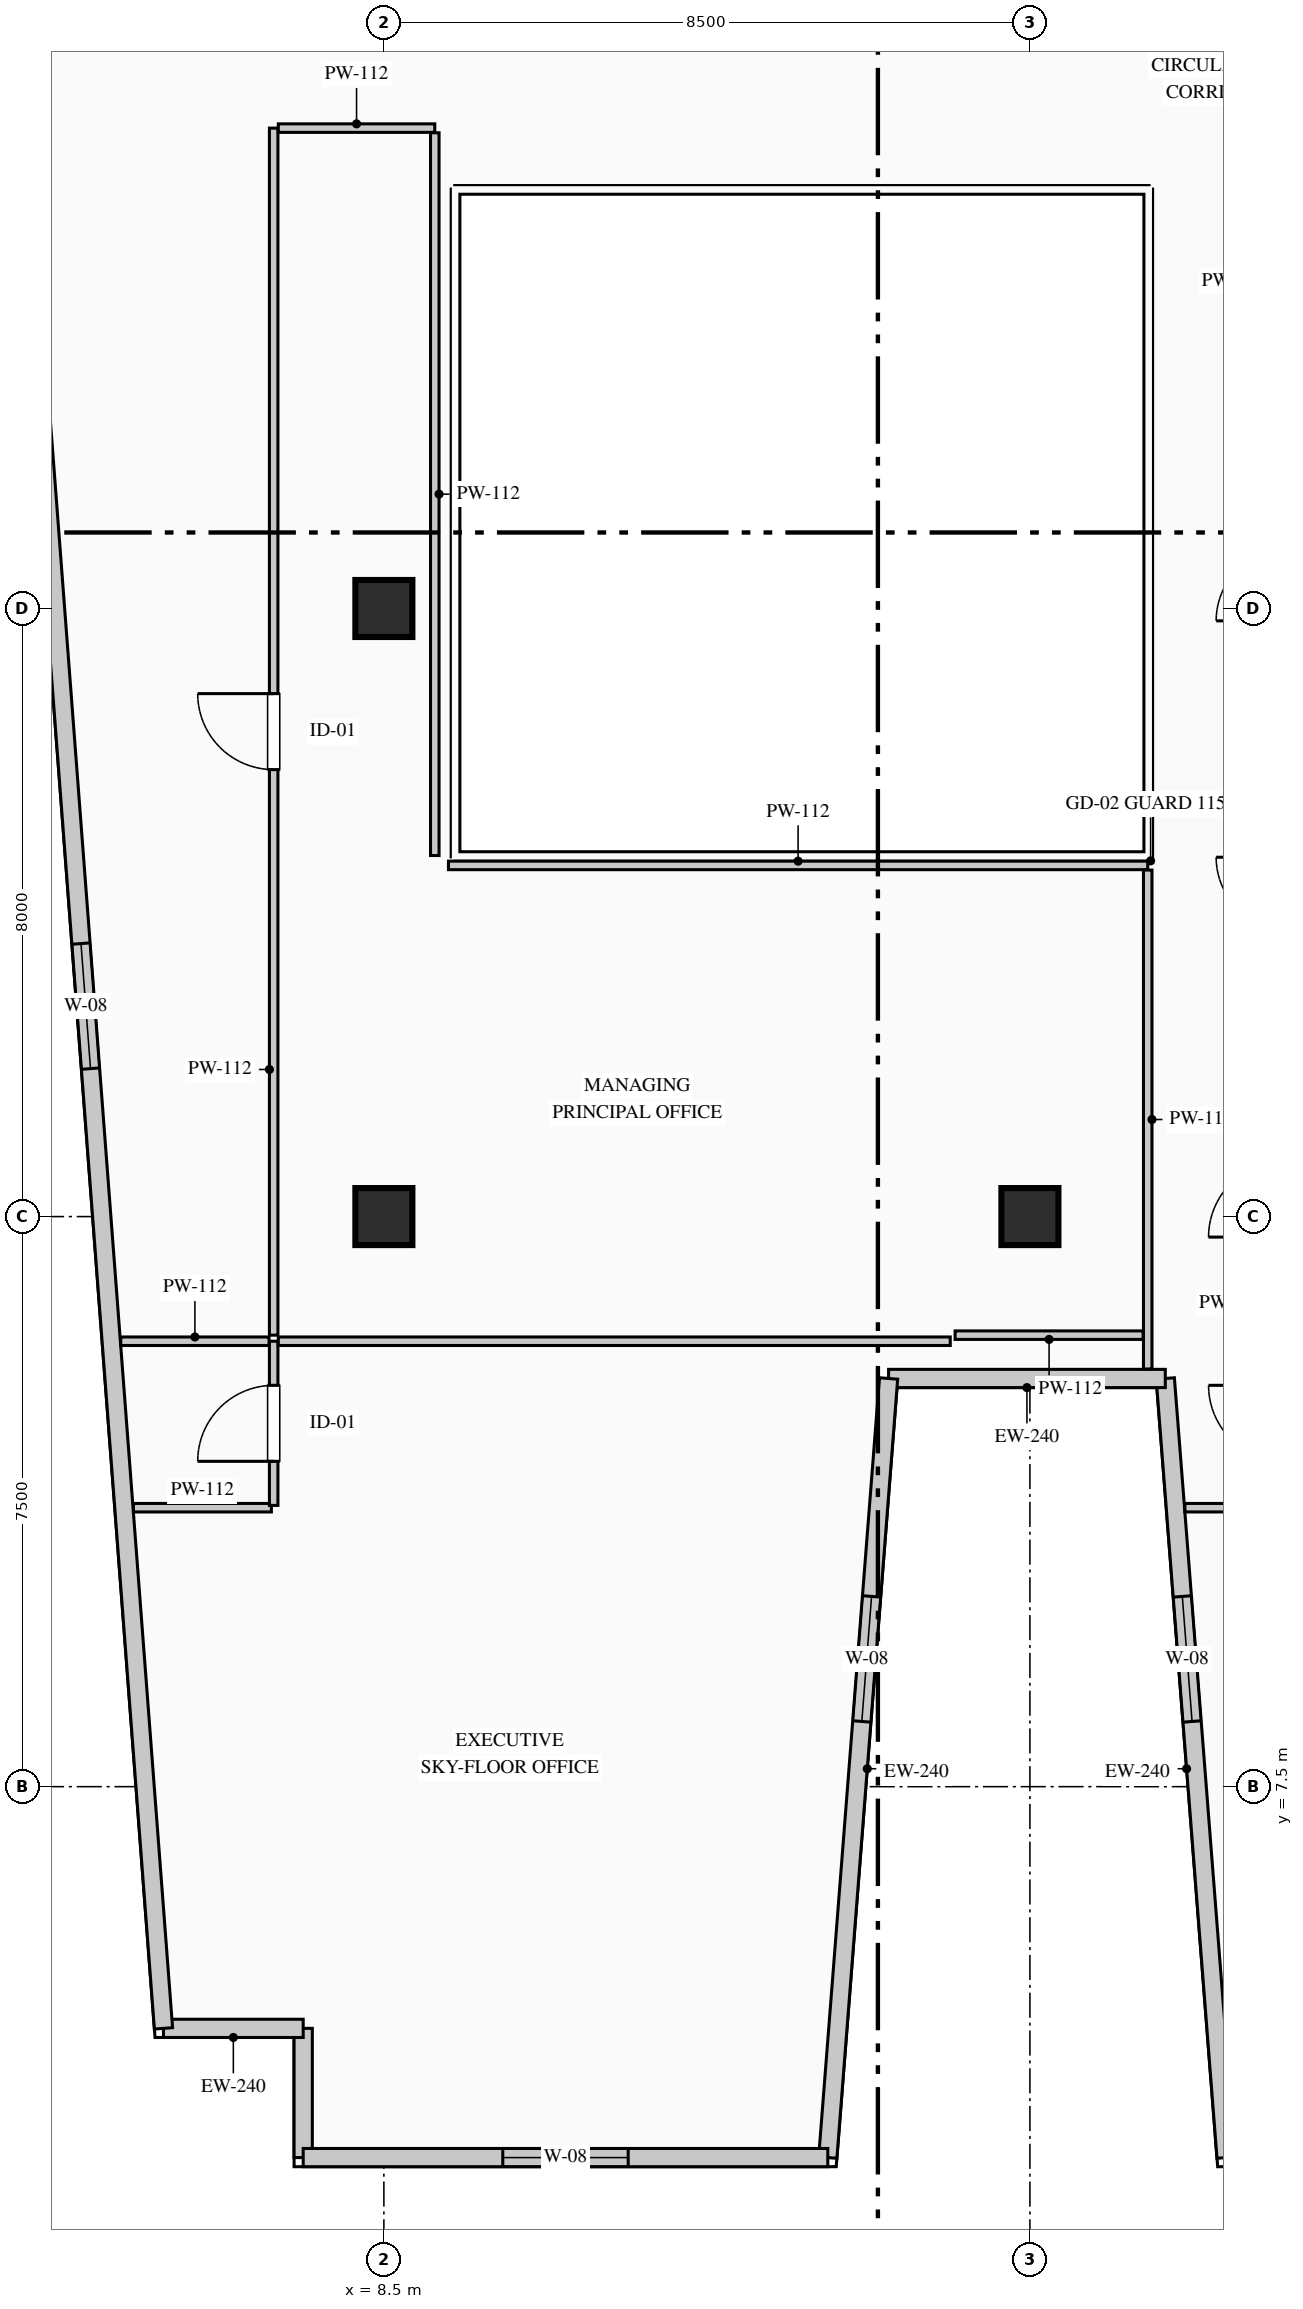
"""IFC4 building model, lengths in metres.
Left out: names, types, materials, properties, quantities, classifications, styles, units other than length and angle.
Written with IfcOpenShell. Run it as: python <this file> out.ifc"""

import sys

from ifc_helpers import new_model, si_unit, direction, frame, frame_2d, origin, origin_2d, place, context, subcontext, project, spatial, rectangle, extrude, element, fill, save


model = new_model("IFC4")
c1 = context("Model", 3, precision=1e-05, world=origin(), true_north=direction((0.0, 1.0)))
c2 = subcontext(c1, "Body", "Model", "MODEL_VIEW")
j1 = project(units=[si_unit("LENGTHUNIT", "METRE"), si_unit("PLANEANGLEUNIT", "RADIAN")], contexts=[c1])
p1 = place(None, origin())
s1 = spatial("IfcSite", under=j1, at=p1, CompositionType="ELEMENT")
p2 = place(p1, origin())
s2 = spatial("IfcBuilding", under=s1, at=p2, CompositionType="ELEMENT")
p3 = place(p2, frame((0.0, 0.0, 276.45)))
s3 = spatial("IfcBuildingStorey", under=s2, at=p3, CompositionType="ELEMENT", Elevation=276.45)
for number, where, z_axis, x_axis in (
    (1, (8.5, 15.0, 0.0), (0.0, 0.0, 1.0), (1.0, 0.0, 0.0)),
    (2, (8.5, 23.0, 0.0), (0.0, 0.0, 1.0), (1.0, 0.0, 0.0)),
    (3, (17.0, 15.0, 0.0), (0.0, 0.0, 1.0), (1.0, 0.0, 0.0)),
):
    element("IfcColumn", number, at=place(p3, frame(where, z_axis=z_axis, x_axis=x_axis)), inside=s3, PredefinedType="COLUMN", context=c2, shape_type="SweptSolid", body=[
        extrude(rectangle(XDim=0.75, YDim=0.75, at=origin_2d()), origin(), (0.0, 0.0, 1.0), 3.95),
    ])
p4 = place(p3, frame((7.438, 2.62, 0.0), z_axis=(0.0, 0.0, 1.0), x_axis=(0.0, 1.0, 0.0)))
e4 = element("IfcWall", 4, at=p4, inside=s3, PredefinedType="STANDARD", context=c2, shape_type="SweptSolid", body=[
    extrude(rectangle(XDim=1.7, YDim=0.24, at=frame_2d((0.85, 0.0))), origin(), (0.0, 0.0, 1.0), 3.7),
])
p5 = place(p3, frame((7.438, 4.32, 0.0), z_axis=(0.0, 0.0, 1.0), x_axis=(-1.0, 0.0, 0.0)))
e5 = element("IfcWall", 5, at=p5, inside=s3, PredefinedType="STANDARD", context=c2, shape_type="SweptSolid", body=[
    extrude(rectangle(XDim=1.838, YDim=0.24, at=frame_2d((0.919, 0.0))), origin(), (0.0, 0.0, 1.0), 3.7),
])
p6 = place(p3, frame((5.6, 4.32, 0.0), z_axis=(0.0, 0.0, 1.0), x_axis=(-0.075839920993, 0.997120006009, 0.0)))
e6 = element("IfcWall", 6, at=p6, inside=s3, PredefinedType="STANDARD", context=c2, shape_type="SweptSolid", body=[
    extrude(rectangle(XDim=37.468, YDim=0.24, at=frame_2d((18.734, 0.0))), origin(), (0.0, 0.0, 1.0), 3.7),
])
p7 = place(p6, frame((12.663, 0.0, 0.9)))
e7 = element("IfcOpeningElement", 7, at=p7, cuts=e6, PredefinedType="OPENING", context=c2, shape_type="SweptSolid", body=[
    extrude(rectangle(XDim=1.65, YDim=1.95, at=frame_2d((0.825, 0.975))), frame((0.0, 0.13, 0.0), z_axis=(0.0, -1.0, 0.0), x_axis=(1.0, 0.0, 0.0)), (0.0, 0.0, 1.0), 0.26),
])
p8 = place(p3, frame((19.581, 2.62, 0.0), z_axis=(0.0, 0.0, 1.0), x_axis=(-0.077816860153, 0.996967670627, 0.0)))
e8 = element("IfcWall", 8, at=p8, inside=s3, PredefinedType="STANDARD", context=c2, shape_type="SweptSolid", body=[
    extrude(rectangle(XDim=10.281, YDim=0.24, at=frame_2d((5.141, 0.0))), origin(), (0.0, 0.0, 1.0), 3.7),
])
p9 = place(p8, frame((5.755, 0.0, 0.9)))
e9 = element("IfcOpeningElement", 9, at=p9, cuts=e8, PredefinedType="OPENING", context=c2, shape_type="SweptSolid", body=[
    extrude(rectangle(XDim=1.65, YDim=1.95, at=frame_2d((0.825, 0.975))), frame((0.0, 0.13, 0.0), z_axis=(0.0, -1.0, 0.0), x_axis=(1.0, 0.0, 0.0)), (0.0, 0.0, 1.0), 0.26),
])
p10 = place(p3, frame((18.781, 12.87, 0.0), z_axis=(0.0, 0.0, 1.0), x_axis=(-1.0, 0.0, 0.0)))
e10 = element("IfcWall", 10, at=p10, inside=s3, PredefinedType="STANDARD", context=c2, shape_type="SweptSolid", body=[
    extrude(rectangle(XDim=3.641, YDim=0.24, at=frame_2d((1.82, 0.0))), origin(), (0.0, 0.0, 1.0), 3.7),
])
p11 = place(p3, frame((15.14, 12.87, 0.0), z_axis=(0.0, 0.0, 1.0), x_axis=(-0.077793257511, -0.996969512616, 0.0)))
e11 = element("IfcWall", 11, at=p11, inside=s3, PredefinedType="STANDARD", context=c2, shape_type="SweptSolid", body=[
    extrude(rectangle(XDim=10.281, YDim=0.24, at=frame_2d((5.141, 0.0))), origin(), (0.0, 0.0, 1.0), 3.7),
])
p12 = place(p11, frame((2.876, 0.0, 0.9)))
e12 = element("IfcOpeningElement", 12, at=p12, cuts=e11, PredefinedType="OPENING", context=c2, shape_type="SweptSolid", body=[
    extrude(rectangle(XDim=1.65, YDim=1.95, at=frame_2d((0.825, 0.975))), frame((0.0, 0.13, 0.0), z_axis=(0.0, -1.0, 0.0), x_axis=(1.0, 0.0, 0.0)), (0.0, 0.0, 1.0), 0.26),
])
p13 = place(p3, frame((14.341, 2.62, 0.0), z_axis=(0.0, 0.0, 1.0), x_axis=(-1.0, 0.0, 0.0)))
e13 = element("IfcWall", 13, at=p13, inside=s3, PredefinedType="STANDARD", context=c2, shape_type="SweptSolid", body=[
    extrude(rectangle(XDim=6.902, YDim=0.24, at=frame_2d((3.451, 0.0))), origin(), (0.0, 0.0, 1.0), 3.7),
])
p14 = place(p13, frame((2.626, 0.0, 0.9)))
e14 = element("IfcOpeningElement", 14, at=p14, cuts=e13, PredefinedType="OPENING", context=c2, shape_type="SweptSolid", body=[
    extrude(rectangle(XDim=1.65, YDim=1.95, at=frame_2d((0.825, 0.975))), frame((0.0, 0.13, 0.0), z_axis=(0.0, -1.0, 0.0), x_axis=(1.0, 0.0, 0.0)), (0.0, 0.0, 1.0), 0.26),
])
p15 = place(p3, frame((5.205, 11.17, 0.0), z_axis=(0.0, 0.0, 1.0), x_axis=(1.0, 0.0, 0.0)))
e15 = element("IfcWall", 15, at=p15, inside=s3, PredefinedType="PARTITIONING", context=c2, shape_type="SweptSolid", body=[
    extrude(rectangle(XDim=1.815, YDim=0.112, at=frame_2d((0.908, 0.0))), origin(), (0.0, 0.0, 1.0), 3.7),
])
p16 = place(p3, frame((7.05, 11.2, 0.0), z_axis=(0.0, 0.0, 1.0), x_axis=(0.0, 1.0, 0.0)))
e16 = element("IfcWall", 16, at=p16, inside=s3, PredefinedType="PARTITIONING", context=c2, shape_type="SweptSolid", body=[
    extrude(rectangle(XDim=2.16, YDim=0.112, at=frame_2d((1.08, 0.0))), origin(), (0.0, 0.0, 1.0), 3.7),
])
p17 = place(p16, frame((0.58, 0.0, 0.0)))
e17 = element("IfcOpeningElement", 17, at=p17, cuts=e16, PredefinedType="OPENING", context=c2, shape_type="SweptSolid", body=[
    extrude(rectangle(XDim=1.0, YDim=2.15, at=frame_2d((0.5, 1.075))), frame((0.0, 0.066, 0.0), z_axis=(0.0, -1.0, 0.0), x_axis=(1.0, 0.0, 0.0)), (0.0, 0.0, 1.0), 0.132),
])
p18 = place(p3, frame((5.038, 13.36, 0.0), z_axis=(0.0, 0.0, 1.0), x_axis=(1.0, 0.0, 0.0)))
e18 = element("IfcWall", 18, at=p18, inside=s3, PredefinedType="PARTITIONING", context=c2, shape_type="SweptSolid", body=[
    extrude(rectangle(XDim=1.951, YDim=0.112, at=frame_2d((0.976, 0.0))), origin(), (0.0, 0.0, 1.0), 3.7),
])
p19 = place(p3, frame((7.111, 13.36, 0.0), z_axis=(0.0, 0.0, 1.0), x_axis=(1.0, 0.0, 0.0)))
e19 = element("IfcWall", 19, at=p19, inside=s3, PredefinedType="PARTITIONING", context=c2, shape_type="SweptSolid", body=[
    extrude(rectangle(XDim=8.841, YDim=0.112, at=frame_2d((4.42, 0.0))), origin(), (0.0, 0.0, 1.0), 3.7),
])
p20 = place(p3, frame((19.039, 11.17, 0.0), z_axis=(0.0, 0.0, 1.0), x_axis=(1.0, 0.0, 0.0)))
e20 = element("IfcWall", 20, at=p20, inside=s3, PredefinedType="PARTITIONING", context=c2, shape_type="SweptSolid", body=[
    extrude(rectangle(XDim=1.281, YDim=0.112, at=frame_2d((0.64, 0.0))), origin(), (0.0, 0.0, 1.0), 3.7),
])
p21 = place(p3, frame((9.35, 19.62, 0.0), z_axis=(0.0, 0.0, 1.0), x_axis=(1.0, 0.0, 0.0)))
e21 = element("IfcWall", 21, at=p21, inside=s3, PredefinedType="PARTITIONING", context=c2, shape_type="SweptSolid", body=[
    extrude(rectangle(XDim=9.2, YDim=0.112, at=frame_2d((4.6, 0.0))), origin(), (0.0, 0.0, 1.0), 3.7),
])
p22 = place(p3, frame((18.55, 19.559, 0.0), z_axis=(0.0, 0.0, 1.0), x_axis=(0.0, -1.0, 0.0)))
e22 = element("IfcWall", 22, at=p22, inside=s3, PredefinedType="PARTITIONING", context=c2, shape_type="SweptSolid", body=[
    extrude(rectangle(XDim=6.564, YDim=0.112, at=frame_2d((3.282, 0.0))), origin(), (0.0, 0.0, 1.0), 3.7),
])
p23 = place(p3, frame((18.489, 13.44, 0.0), z_axis=(0.0, 0.0, 1.0), x_axis=(-1.0, 0.0, 0.0)))
e23 = element("IfcWall", 23, at=p23, inside=s3, PredefinedType="PARTITIONING", context=c2, shape_type="SweptSolid", body=[
    extrude(rectangle(XDim=2.474, YDim=0.112, at=frame_2d((1.237, 0.0))), origin(), (0.0, 0.0, 1.0), 3.7),
])
p24 = place(p3, frame((7.05, 13.44, 0.0), z_axis=(0.0, 0.0, 1.0), x_axis=(0.0, 1.0, 0.0)))
e24 = element("IfcWall", 24, at=p24, inside=s3, PredefinedType="PARTITIONING", context=c2, shape_type="SweptSolid", body=[
    extrude(rectangle(XDim=15.88, YDim=0.112, at=frame_2d((7.94, 0.0))), origin(), (0.0, 0.0, 1.0), 3.7),
])
p25 = place(p24, frame((7.44, 0.0, 0.0)))
e25 = element("IfcOpeningElement", 25, at=p25, cuts=e24, PredefinedType="OPENING", context=c2, shape_type="SweptSolid", body=[
    extrude(rectangle(XDim=1.0, YDim=2.15, at=frame_2d((0.5, 1.075))), frame((0.0, 0.066, 0.0), z_axis=(0.0, -1.0, 0.0), x_axis=(1.0, 0.0, 0.0)), (0.0, 0.0, 1.0), 0.132),
])
p26 = place(p3, frame((7.111, 29.32, 0.0), z_axis=(0.0, 0.0, 1.0), x_axis=(1.0, 0.0, 0.0)))
e26 = element("IfcWall", 26, at=p26, inside=s3, PredefinedType="PARTITIONING", context=c2, shape_type="SweptSolid", body=[
    extrude(rectangle(XDim=2.059, YDim=0.112, at=frame_2d((1.029, 0.0))), origin(), (0.0, 0.0, 1.0), 3.7),
])
p27 = place(p3, frame((9.17, 29.259, 0.0), z_axis=(0.0, 0.0, 1.0), x_axis=(0.0, -1.0, 0.0)))
e27 = element("IfcWall", 27, at=p27, inside=s3, PredefinedType="PARTITIONING", context=c2, shape_type="SweptSolid", body=[
    extrude(rectangle(XDim=9.509, YDim=0.112, at=frame_2d((4.754, 0.0))), origin(), (0.0, 0.0, 1.0), 3.285),
])
p28 = place(p7, origin())
e28 = element("IfcWindow", 28, at=p28, inside=s3, PartitioningType="SINGLE_PANEL", PredefinedType="WINDOW", context=c2, shape_type="SweptSolid", body=[
    extrude(rectangle(XDim=1.65, YDim=1.95, at=frame_2d((0.825, 0.975))), frame((0.0, 0.03, 0.0), z_axis=(0.0, -1.0, 0.0), x_axis=(1.0, 0.0, 0.0)), (0.0, 0.0, 1.0), 0.06),
])
fill(e7, e28)
p29 = place(p9, origin())
e29 = element("IfcWindow", 29, at=p29, inside=s3, PartitioningType="SINGLE_PANEL", PredefinedType="WINDOW", context=c2, shape_type="SweptSolid", body=[
    extrude(rectangle(XDim=1.65, YDim=1.95, at=frame_2d((0.825, 0.975))), frame((0.0, 0.03, 0.0), z_axis=(0.0, -1.0, 0.0), x_axis=(1.0, 0.0, 0.0)), (0.0, 0.0, 1.0), 0.06),
])
fill(e9, e29)
p30 = place(p12, origin())
e30 = element("IfcWindow", 30, at=p30, inside=s3, PartitioningType="SINGLE_PANEL", PredefinedType="WINDOW", context=c2, shape_type="SweptSolid", body=[
    extrude(rectangle(XDim=1.65, YDim=1.95, at=frame_2d((0.825, 0.975))), frame((0.0, 0.03, 0.0), z_axis=(0.0, -1.0, 0.0), x_axis=(1.0, 0.0, 0.0)), (0.0, 0.0, 1.0), 0.06),
])
fill(e12, e30)
p31 = place(p14, origin())
e31 = element("IfcWindow", 31, at=p31, inside=s3, PartitioningType="SINGLE_PANEL", PredefinedType="WINDOW", context=c2, shape_type="SweptSolid", body=[
    extrude(rectangle(XDim=1.65, YDim=1.95, at=frame_2d((0.825, 0.975))), frame((0.0, 0.03, 0.0), z_axis=(0.0, -1.0, 0.0), x_axis=(1.0, 0.0, 0.0)), (0.0, 0.0, 1.0), 0.06),
])
fill(e14, e31)
p32 = place(p17, origin())
e32 = element("IfcDoor", 32, at=p32, inside=s3, OperationType="SINGLE_SWING_LEFT", PredefinedType="DOOR", context=c2, shape_type="SweptSolid", body=[
    extrude(rectangle(XDim=1.0, YDim=2.15, at=frame_2d((0.5, 1.075))), frame((0.0, 0.025, 0.0), z_axis=(0.0, -1.0, 0.0), x_axis=(1.0, 0.0, 0.0)), (0.0, 0.0, 1.0), 0.05),
])
fill(e17, e32)
p33 = place(p25, origin())
e33 = element("IfcDoor", 33, at=p33, inside=s3, OperationType="SINGLE_SWING_RIGHT", PredefinedType="DOOR", context=c2, shape_type="SweptSolid", body=[
    extrude(rectangle(XDim=1.0, YDim=2.15, at=frame_2d((0.5, 1.075))), frame((0.0, 0.025, 0.0), z_axis=(0.0, -1.0, 0.0), x_axis=(1.0, 0.0, 0.0)), (0.0, 0.0, 1.0), 0.05),
])
fill(e25, e33)
save(model, sys.argv[1])
